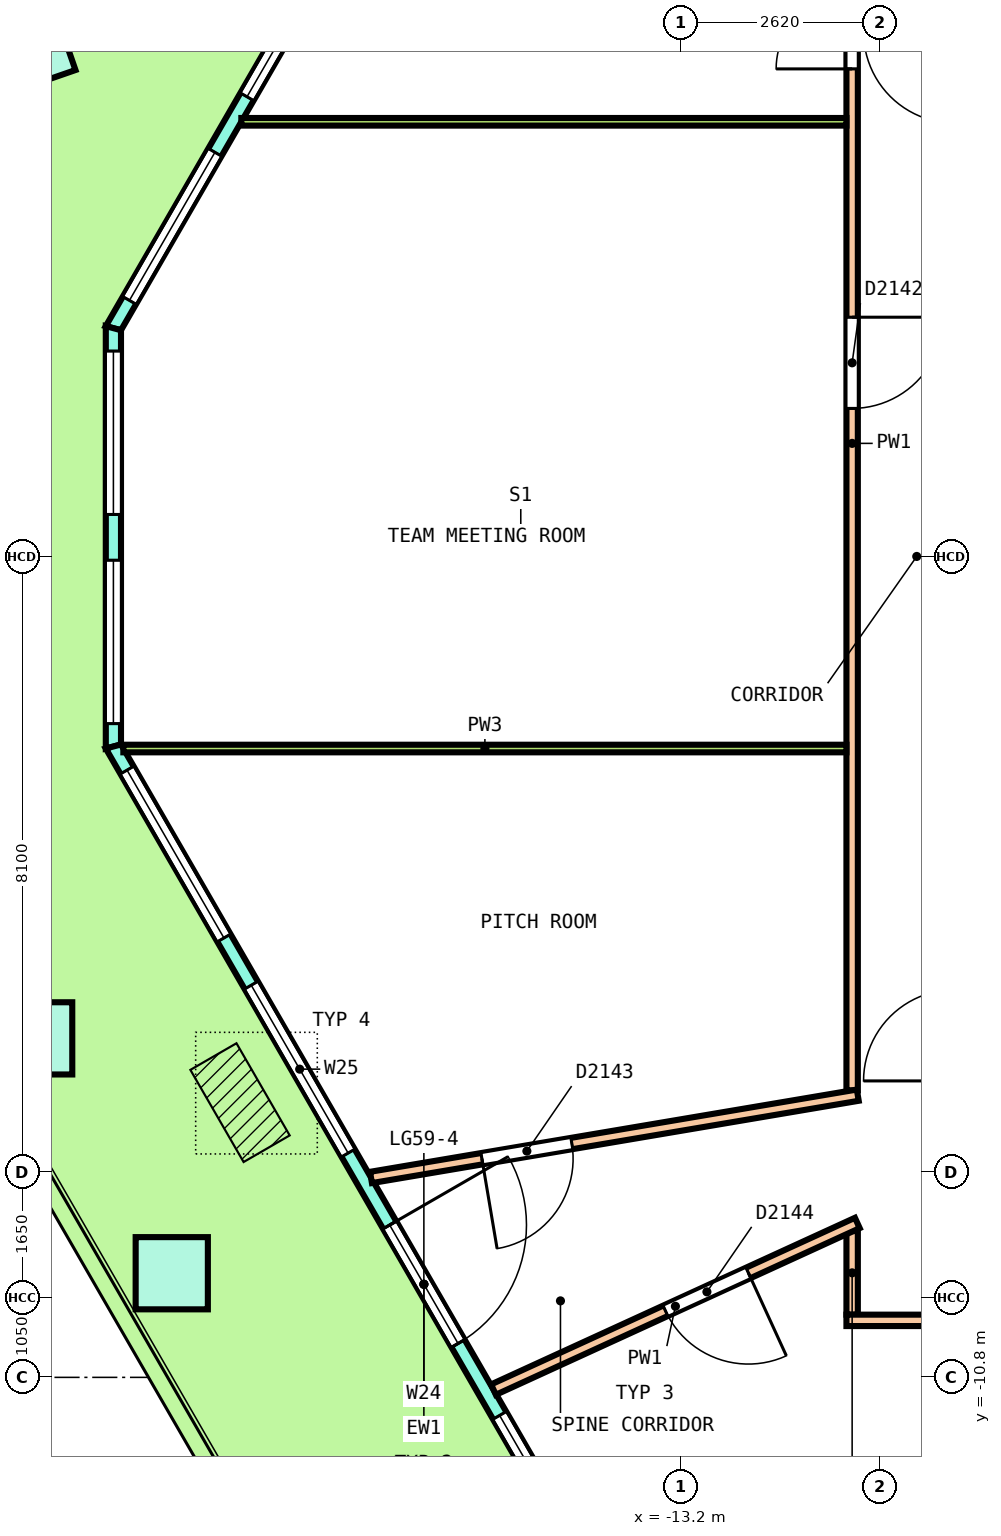
"""IFC4 building model, lengths in metres.
Left out: names, types, materials, properties, quantities, classifications, styles, units other than length and angle.
Written with IfcOpenShell. Run it as: python <this file> out.ifc"""

import sys

from ifc_helpers import new_model, si_unit, direction, frame, frame_2d, origin, origin_2d, place, context, subcontext, project, spatial, polyline, rectangle, outline, extrude, element, fill, save


model = new_model("IFC4")
c1 = context("Model", 3, precision=1e-05, world=origin(), true_north=direction((0.0, 1.0)))
c2 = subcontext(c1, "Body", "Model", "MODEL_VIEW")
j1 = project(units=[si_unit("LENGTHUNIT", "METRE"), si_unit("PLANEANGLEUNIT", "RADIAN")], contexts=[c1])
p1 = place(None, origin())
s1 = spatial("IfcSite", under=j1, at=p1, CompositionType="ELEMENT")
p2 = place(p1, origin())
s2 = spatial("IfcBuilding", under=s1, at=p2, CompositionType="ELEMENT")
p3 = place(p2, frame((0.0, 0.0, 271.0)))
s3 = spatial("IfcBuildingStorey", under=s2, at=p3, CompositionType="ELEMENT", Elevation=271.0)
p4 = place(p3, frame((-21.772, 6.692, 0.0), z_axis=(-0.021793949015, 0.025136579231, 0.999446434868), x_axis=(-0.499665408411, -0.866150057728, 0.010888394553)))
e1 = element("IfcColumn", 1, at=p4, inside=s3, PredefinedType="COLUMN", context=c2, shape_type="SweptSolid", body=[
    extrude(rectangle(XDim=0.95, YDim=0.95, at=origin_2d()), origin(), (0.0, 0.0, 1.0), 3.652),
])
p5 = place(p3, frame((-21.685, -6.34, 0.0), z_axis=(-0.010900423214, 0.018858400897, 0.999762742599), x_axis=(0.500590318805, -0.865410234662, 0.021782067434)))
e2 = element("IfcColumn", 2, at=p5, inside=s3, PredefinedType="COLUMN", context=c2, shape_type="SweptSolid", body=[
    extrude(rectangle(XDim=0.95, YDim=0.95, at=origin_2d()), origin(), (0.0, 0.0, 1.0), 3.651),
])
p6 = place(p3, frame((-19.901, -9.43, 0.0), z_axis=(-0.003611945175, 0.00628746012, 0.999973710503), x_axis=(0.497890394796, -0.867209649664, 0.007251089524)))
e3 = element("IfcColumn", 3, at=p6, inside=s3, PredefinedType="COLUMN", context=c2, shape_type="SweptSolid", body=[
    extrude(rectangle(XDim=0.95, YDim=0.95, at=origin_2d()), origin(), (0.0, 0.0, 1.0), 3.65),
])
p7 = place(p3, frame((-12.935, 16.398, 0.0), z_axis=(0.0, 0.0, 1.0), x_axis=(-0.500001185373, -0.866024719408, 0.0)))
e4 = element("IfcWall", 4, at=p7, inside=s3, PredefinedType="SOLIDWALL", context=c2, shape_type="SweptSolid", body=[
    extrude(outline(polyline([(-0.027, -0.1), (1.008, -0.1), (2.043, -0.1), (3.077, -0.1), (4.112, -0.1), (5.147, -0.1), (6.182, -0.1), (7.216, -0.1), (8.251, -0.1), (9.286, -0.1), (10.321, -0.1), (11.355, -0.1), (12.39, -0.1), (13.425, -0.1), (14.459, -0.1), (15.494, -0.1), (15.44, 0.1), (14.413, 0.1), (13.385, 0.1), (12.358, 0.1), (11.33, 0.1), (10.302, 0.1), (9.275, 0.1), (8.247, 0.1), (7.22, 0.1), (6.192, 0.1), (5.165, 0.1), (4.137, 0.1), (3.11, 0.1), (2.082, 0.1), (1.054, 0.1), (0.027, 0.1), (-0.027, -0.1)])), origin(), (0.0, 0.0, 1.0), 3.7),
])
p8 = place(p7, frame((0.422, 0.0, 0.1)))
e5 = element("IfcOpeningElement", 5, at=p8, cuts=e4, PredefinedType="OPENING", context=c2, shape_type="SweptSolid", body=[
    extrude(rectangle(XDim=2.25, YDim=2.75, at=frame_2d((1.125, 1.375))), frame((0.0, 0.11, 0.0), z_axis=(0.0, -1.0, 0.0), x_axis=(1.0, 0.0, 0.0)), (0.0, 0.0, 1.0), 0.22),
])
p9 = place(p7, frame((3.515, 0.0, 0.1)))
e6 = element("IfcOpeningElement", 6, at=p9, cuts=e4, PredefinedType="OPENING", context=c2, shape_type="SweptSolid", body=[
    extrude(rectangle(XDim=2.25, YDim=2.75, at=frame_2d((1.125, 1.375))), frame((0.0, 0.11, 0.0), z_axis=(0.0, -1.0, 0.0), x_axis=(1.0, 0.0, 0.0)), (0.0, 0.0, 1.0), 0.22),
])
p10 = place(p7, frame((6.834, 0.0, 0.0)))
e7 = element("IfcOpeningElement", 7, at=p10, cuts=e4, PredefinedType="OPENING", context=c2, shape_type="SweptSolid", body=[
    extrude(rectangle(XDim=1.8, YDim=2.4, at=frame_2d((0.9, 1.2))), frame((0.0, 0.11, 0.0), z_axis=(0.0, -1.0, 0.0), x_axis=(1.0, 0.0, 0.0)), (0.0, 0.0, 1.0), 0.22),
])
p11 = place(p7, frame((6.834, 0.0, 2.55)))
e8 = element("IfcOpeningElement", 8, at=p11, cuts=e4, PredefinedType="OPENING", context=c2, shape_type="SweptSolid", body=[
    extrude(rectangle(XDim=1.8, YDim=0.3, at=frame_2d((0.9, 0.15))), frame((0.0, 0.11, 0.0), z_axis=(0.0, -1.0, 0.0), x_axis=(1.0, 0.0, 0.0)), (0.0, 0.0, 1.0), 0.22),
])
p12 = place(p7, frame((9.702, 0.0, 0.1)))
e9 = element("IfcOpeningElement", 9, at=p12, cuts=e4, PredefinedType="OPENING", context=c2, shape_type="SweptSolid", body=[
    extrude(rectangle(XDim=2.25, YDim=2.75, at=frame_2d((1.125, 1.375))), frame((0.0, 0.11, 0.0), z_axis=(0.0, -1.0, 0.0), x_axis=(1.0, 0.0, 0.0)), (0.0, 0.0, 1.0), 0.22),
])
p13 = place(p7, frame((12.796, 0.0, 0.1)))
e10 = element("IfcOpeningElement", 10, at=p13, cuts=e4, PredefinedType="OPENING", context=c2, shape_type="SweptSolid", body=[
    extrude(rectangle(XDim=2.25, YDim=2.75, at=frame_2d((1.125, 1.375))), frame((0.0, 0.11, 0.0), z_axis=(0.0, -1.0, 0.0), x_axis=(1.0, 0.0, 0.0)), (0.0, 0.0, 1.0), 0.22),
])
p14 = place(p3, frame((-20.669, 3.003, 0.0), z_axis=(0.0, 0.0, 1.0), x_axis=(0.0, -1.0, 0.0)))
e11 = element("IfcWall", 11, at=p14, inside=s3, PredefinedType="SOLIDWALL", context=c2, shape_type="SweptSolid", body=[
    extrude(outline(polyline([(-0.027, -0.1), (1.084, -0.1), (2.196, -0.1), (3.307, -0.1), (4.419, -0.1), (5.53, -0.1), (5.477, 0.1), (4.387, 0.1), (3.297, 0.1), (2.207, 0.1), (1.117, 0.1), (0.027, 0.1), (-0.027, -0.1)])), origin(), (0.0, 0.0, 1.0), 3.7),
])
p15 = place(p14, frame((0.301, 0.0, 0.1)))
e12 = element("IfcOpeningElement", 12, at=p15, cuts=e11, PredefinedType="OPENING", context=c2, shape_type="SweptSolid", body=[
    extrude(rectangle(XDim=2.15, YDim=2.75, at=frame_2d((1.075, 1.375))), frame((0.0, 0.11, 0.0), z_axis=(0.0, -1.0, 0.0), x_axis=(1.0, 0.0, 0.0)), (0.0, 0.0, 1.0), 0.22),
])
p16 = place(p14, frame((3.052, 0.0, 0.1)))
e13 = element("IfcOpeningElement", 13, at=p16, cuts=e11, PredefinedType="OPENING", context=c2, shape_type="SweptSolid", body=[
    extrude(rectangle(XDim=2.15, YDim=2.75, at=frame_2d((1.075, 1.375))), frame((0.0, 0.11, 0.0), z_axis=(0.0, -1.0, 0.0), x_axis=(1.0, 0.0, 0.0)), (0.0, 0.0, 1.0), 0.22),
])
p17 = place(p3, frame((-20.669, -2.5, 0.0), z_axis=(0.0, 0.0, 1.0), x_axis=(0.50000098397, -0.866024835688, 0.0)))
e14 = element("IfcWall", 14, at=p17, inside=s3, PredefinedType="SOLIDWALL", context=c2, shape_type="SweptSolid", body=[
    extrude(outline(polyline([(-0.027, -0.1), (0.998, -0.1), (2.022, -0.1), (3.047, -0.1), (4.071, -0.1), (5.096, -0.1), (6.12, -0.1), (7.145, -0.1), (8.169, -0.1), (9.194, -0.1), (10.218, -0.1), (11.243, -0.1), (12.267, -0.1), (13.292, -0.1), (14.316, -0.1), (15.341, -0.1), (16.365, -0.1), (16.312, 0.1), (15.294, 0.1), (14.276, 0.1), (13.258, 0.1), (12.24, 0.1), (11.223, 0.1), (10.205, 0.1), (9.187, 0.1), (8.169, 0.1), (7.151, 0.1), (6.134, 0.1), (5.116, 0.1), (4.098, 0.1), (3.08, 0.1), (2.062, 0.1), (1.045, 0.1), (0.027, 0.1), (-0.027, -0.1)])), origin(), (0.0, 0.0, 1.0), 3.7),
])
p18 = place(p17, frame((0.359, 0.0, 0.1)))
e15 = element("IfcOpeningElement", 15, at=p18, cuts=e14, PredefinedType="OPENING", context=c2, shape_type="SweptSolid", body=[
    extrude(rectangle(XDim=2.55, YDim=2.75, at=frame_2d((1.275, 1.375))), frame((0.0, 0.11, 0.0), z_axis=(0.0, -1.0, 0.0), x_axis=(1.0, 0.0, 0.0)), (0.0, 0.0, 1.0), 0.22),
])
p19 = place(p17, frame((3.626, 0.0, 0.1)))
e16 = element("IfcOpeningElement", 16, at=p19, cuts=e14, PredefinedType="OPENING", context=c2, shape_type="SweptSolid", body=[
    extrude(rectangle(XDim=2.55, YDim=2.75, at=frame_2d((1.275, 1.375))), frame((0.0, 0.11, 0.0), z_axis=(0.0, -1.0, 0.0), x_axis=(1.0, 0.0, 0.0)), (0.0, 0.0, 1.0), 0.22),
])
p20 = place(p17, frame((7.269, 0.0, 0.0)))
e17 = element("IfcOpeningElement", 17, at=p20, cuts=e14, PredefinedType="OPENING", context=c2, shape_type="SweptSolid", body=[
    extrude(rectangle(XDim=1.8, YDim=2.4, at=frame_2d((0.9, 1.2))), frame((0.0, 0.11, 0.0), z_axis=(0.0, -1.0, 0.0), x_axis=(1.0, 0.0, 0.0)), (0.0, 0.0, 1.0), 0.22),
])
p21 = place(p17, frame((7.269, 0.0, 2.55)))
e18 = element("IfcOpeningElement", 18, at=p21, cuts=e14, PredefinedType="OPENING", context=c2, shape_type="SweptSolid", body=[
    extrude(rectangle(XDim=1.8, YDim=0.3, at=frame_2d((0.9, 0.15))), frame((0.0, 0.11, 0.0), z_axis=(0.0, -1.0, 0.0), x_axis=(1.0, 0.0, 0.0)), (0.0, 0.0, 1.0), 0.22),
])
p22 = place(p17, frame((10.162, 0.0, 0.1)))
e19 = element("IfcOpeningElement", 19, at=p22, cuts=e14, PredefinedType="OPENING", context=c2, shape_type="SweptSolid", body=[
    extrude(rectangle(XDim=2.55, YDim=2.75, at=frame_2d((1.275, 1.375))), frame((0.0, 0.11, 0.0), z_axis=(0.0, -1.0, 0.0), x_axis=(1.0, 0.0, 0.0)), (0.0, 0.0, 1.0), 0.22),
])
p23 = place(p17, frame((13.429, 0.0, 0.1)))
e20 = element("IfcOpeningElement", 20, at=p23, cuts=e14, PredefinedType="OPENING", context=c2, shape_type="SweptSolid", body=[
    extrude(rectangle(XDim=2.55, YDim=2.75, at=frame_2d((1.275, 1.375))), frame((0.0, 0.11, 0.0), z_axis=(0.0, -1.0, 0.0), x_axis=(1.0, 0.0, 0.0)), (0.0, 0.0, 1.0), 0.22),
])
p24 = place(p3, frame((-10.95, -9.975, 0.0), z_axis=(0.0, 0.0, 1.0), x_axis=(0.0, 1.0, 0.0)))
e21 = element("IfcWall", 21, at=p24, inside=s3, PredefinedType="PARTITIONING", context=c2, shape_type="SweptSolid", body=[
    extrude(rectangle(XDim=1.1, YDim=0.15, at=frame_2d((0.55, 0.0))), origin(), (0.0, 0.0, 1.0), 3.7),
])
p25 = place(p3, frame((-10.95, -7.025, 0.0), z_axis=(0.0, 0.0, 1.0), x_axis=(0.0, 1.0, 0.0)))
e22 = element("IfcWall", 22, at=p25, inside=s3, PredefinedType="PARTITIONING", context=c2, shape_type="SweptSolid", body=[
    extrude(rectangle(XDim=17.025, YDim=0.15, at=frame_2d((8.512, 0.0))), origin(), (0.0, 0.0, 1.0), 2.9),
])
p26 = place(p25, frame((13.439, 0.0, 0.0)))
e23 = element("IfcOpeningElement", 23, at=p26, cuts=e22, PredefinedType="OPENING", context=c2, shape_type="SweptSolid", body=[
    extrude(rectangle(XDim=1.0, YDim=2.1, at=frame_2d((0.5, 1.05))), frame((0.0, 0.085, 0.0), z_axis=(0.0, -1.0, 0.0), x_axis=(1.0, 0.0, 0.0)), (0.0, 0.0, 1.0), 0.17),
])
p27 = place(p25, frame((8.972, 0.0, 0.0)))
e24 = element("IfcOpeningElement", 24, at=p27, cuts=e22, PredefinedType="OPENING", context=c2, shape_type="SweptSolid", body=[
    extrude(rectangle(XDim=1.2, YDim=2.1, at=frame_2d((0.6, 1.05))), frame((0.0, 0.085, 0.0), z_axis=(0.0, -1.0, 0.0), x_axis=(1.0, 0.0, 0.0)), (0.0, 0.0, 1.0), 0.17),
])
p28 = place(p3, frame((-11.025, -10.05, 0.0), z_axis=(0.0, 0.0, 1.0), x_axis=(1.0, 0.0, 0.0)))
e25 = element("IfcWall", 25, at=p28, inside=s3, PredefinedType="PARTITIONING", context=c2, shape_type="SweptSolid", body=[
    extrude(rectangle(XDim=21.925, YDim=0.15, at=frame_2d((10.962, 0.0))), origin(), (0.0, 0.0, 1.0), 2.9),
])
p29 = place(p28, frame((6.209, 0.0, 0.0)))
e26 = element("IfcOpeningElement", 26, at=p29, cuts=e25, PredefinedType="OPENING", context=c2, shape_type="SweptSolid", body=[
    extrude(rectangle(XDim=1.2, YDim=2.1, at=frame_2d((0.6, 1.05))), frame((0.0, 0.085, 0.0), z_axis=(0.0, -1.0, 0.0), x_axis=(1.0, 0.0, 0.0)), (0.0, 0.0, 1.0), 0.17),
])
p30 = place(p28, frame((14.606, 0.0, 0.0)))
e27 = element("IfcOpeningElement", 27, at=p30, cuts=e25, PredefinedType="OPENING", context=c2, shape_type="SweptSolid", body=[
    extrude(rectangle(XDim=1.2, YDim=2.1, at=frame_2d((0.6, 1.05))), frame((0.0, 0.085, 0.0), z_axis=(0.0, -1.0, 0.0), x_axis=(1.0, 0.0, 0.0)), (0.0, 0.0, 1.0), 0.17),
])
p31 = place(p3, frame((-17.28, -8.17, 0.0), z_axis=(0.0, 0.0, 1.0), x_axis=(0.986013403935, 0.166666035112, 0.0)))
e28 = element("IfcWall", 28, at=p31, inside=s3, PredefinedType="PARTITIONING", context=c2, shape_type="SweptSolid", body=[
    extrude(rectangle(XDim=6.495, YDim=0.15, at=frame_2d((3.248, 0.0))), origin(), (0.0, 0.0, 1.0), 2.9),
])
p32 = place(p31, frame((1.48, 0.0, 0.0)))
e29 = element("IfcOpeningElement", 29, at=p32, cuts=e28, PredefinedType="OPENING", context=c2, shape_type="SweptSolid", body=[
    extrude(rectangle(XDim=1.2, YDim=2.1, at=frame_2d((0.6, 1.05))), frame((0.0, 0.085, 0.0), z_axis=(0.0, -1.0, 0.0), x_axis=(1.0, 0.0, 0.0)), (0.0, 0.0, 1.0), 0.17),
])
p33 = place(p3, frame((-15.669, -10.961, 0.0), z_axis=(0.0, 0.0, 1.0), x_axis=(0.909197237165, 0.416365685342, 0.0)))
e30 = element("IfcWall", 30, at=p33, inside=s3, PredefinedType="PARTITIONING", context=c2, shape_type="SweptSolid", body=[
    extrude(rectangle(XDim=5.265, YDim=0.15, at=frame_2d((2.632, 0.0))), origin(), (0.0, 0.0, 1.0), 2.9),
])
p34 = place(p33, frame((2.489, 0.0, 0.0)))
e31 = element("IfcOpeningElement", 31, at=p34, cuts=e30, PredefinedType="OPENING", context=c2, shape_type="SweptSolid", body=[
    extrude(rectangle(XDim=1.2, YDim=2.1, at=frame_2d((0.6, 1.05))), frame((0.0, 0.085, 0.0), z_axis=(0.0, -1.0, 0.0), x_axis=(1.0, 0.0, 0.0)), (0.0, 0.0, 1.0), 0.17),
])
p35 = place(p3, frame((-18.986, 5.718, 0.0), z_axis=(0.0, 0.0, 1.0), x_axis=(1.0, 0.0, 0.0)))
e32 = element("IfcWall", 32, at=p35, inside=s3, PredefinedType="PARTITIONING", context=c2, shape_type="SweptSolid", body=[
    extrude(rectangle(XDim=7.961, YDim=0.1, at=frame_2d((3.98, 0.0))), origin(), (0.0, 0.0, 1.0), 2.9),
])
p36 = place(p3, frame((-20.538, -2.527, 0.0), z_axis=(0.0, 0.0, 1.0), x_axis=(1.0, 0.0, 0.0)))
e33 = element("IfcWall", 33, at=p36, inside=s3, PredefinedType="PARTITIONING", context=c2, shape_type="SweptSolid", body=[
    extrude(rectangle(XDim=9.513, YDim=0.1, at=frame_2d((4.757, 0.0))), origin(), (0.0, 0.0, 1.0), 2.9),
])
p37 = place(p12, origin())
e34 = element("IfcWindow", 34, at=p37, inside=s3, PartitioningType="SINGLE_PANEL", PredefinedType="WINDOW", context=c2, shape_type="SweptSolid", body=[
    extrude(rectangle(XDim=2.25, YDim=2.75, at=frame_2d((1.125, 1.375))), frame((0.0, 0.03, 0.0), z_axis=(0.0, -1.0, 0.0), x_axis=(1.0, 0.0, 0.0)), (0.0, 0.0, 1.0), 0.06),
])
fill(e9, e34)
p38 = place(p13, origin())
e35 = element("IfcWindow", 35, at=p38, inside=s3, PartitioningType="SINGLE_PANEL", PredefinedType="WINDOW", context=c2, shape_type="SweptSolid", body=[
    extrude(rectangle(XDim=2.25, YDim=2.75, at=frame_2d((1.125, 1.375))), frame((0.0, 0.03, 0.0), z_axis=(0.0, -1.0, 0.0), x_axis=(1.0, 0.0, 0.0)), (0.0, 0.0, 1.0), 0.06),
])
fill(e10, e35)
p39 = place(p15, origin())
e36 = element("IfcWindow", 36, at=p39, inside=s3, PartitioningType="SINGLE_PANEL", PredefinedType="WINDOW", context=c2, shape_type="SweptSolid", body=[
    extrude(rectangle(XDim=2.15, YDim=2.75, at=frame_2d((1.075, 1.375))), frame((0.0, 0.03, 0.0), z_axis=(0.0, -1.0, 0.0), x_axis=(1.0, 0.0, 0.0)), (0.0, 0.0, 1.0), 0.06),
])
fill(e12, e36)
p40 = place(p16, origin())
e37 = element("IfcWindow", 37, at=p40, inside=s3, PartitioningType="SINGLE_PANEL", PredefinedType="WINDOW", context=c2, shape_type="SweptSolid", body=[
    extrude(rectangle(XDim=2.15, YDim=2.75, at=frame_2d((1.075, 1.375))), frame((0.0, 0.03, 0.0), z_axis=(0.0, -1.0, 0.0), x_axis=(1.0, 0.0, 0.0)), (0.0, 0.0, 1.0), 0.06),
])
fill(e13, e37)
p41 = place(p18, origin())
e38 = element("IfcWindow", 38, at=p41, inside=s3, PartitioningType="SINGLE_PANEL", PredefinedType="WINDOW", context=c2, shape_type="SweptSolid", body=[
    extrude(rectangle(XDim=2.55, YDim=2.75, at=frame_2d((1.275, 1.375))), frame((0.0, 0.03, 0.0), z_axis=(0.0, -1.0, 0.0), x_axis=(1.0, 0.0, 0.0)), (0.0, 0.0, 1.0), 0.06),
])
fill(e15, e38)
p42 = place(p19, origin())
e39 = element("IfcWindow", 39, at=p42, inside=s3, PartitioningType="SINGLE_PANEL", PredefinedType="WINDOW", context=c2, shape_type="SweptSolid", body=[
    extrude(rectangle(XDim=2.55, YDim=2.75, at=frame_2d((1.275, 1.375))), frame((0.0, 0.03, 0.0), z_axis=(0.0, -1.0, 0.0), x_axis=(1.0, 0.0, 0.0)), (0.0, 0.0, 1.0), 0.06),
])
fill(e16, e39)
p43 = place(p20, origin())
e40 = element("IfcDoor", 40, at=p43, inside=s3, OperationType="DOUBLE_DOOR_SINGLE_SWING", PredefinedType="DOOR", context=c2, shape_type="SweptSolid", body=[
    extrude(rectangle(XDim=1.8, YDim=2.4, at=frame_2d((0.9, 1.2))), frame((0.0, 0.025, 0.0), z_axis=(0.0, -1.0, 0.0), x_axis=(1.0, 0.0, 0.0)), (0.0, 0.0, 1.0), 0.05),
])
fill(e17, e40)
p44 = place(p21, origin())
e41 = element("IfcWindow", 41, at=p44, inside=s3, PartitioningType="SINGLE_PANEL", PredefinedType="WINDOW", context=c2, shape_type="SweptSolid", body=[
    extrude(rectangle(XDim=1.8, YDim=0.3, at=frame_2d((0.9, 0.15))), frame((0.0, 0.03, 0.0), z_axis=(0.0, -1.0, 0.0), x_axis=(1.0, 0.0, 0.0)), (0.0, 0.0, 1.0), 0.06),
])
fill(e18, e41)
p45 = place(p22, origin())
e42 = element("IfcWindow", 42, at=p45, inside=s3, PartitioningType="SINGLE_PANEL", PredefinedType="WINDOW", context=c2, shape_type="SweptSolid", body=[
    extrude(rectangle(XDim=2.55, YDim=2.75, at=frame_2d((1.275, 1.375))), frame((0.0, 0.03, 0.0), z_axis=(0.0, -1.0, 0.0), x_axis=(1.0, 0.0, 0.0)), (0.0, 0.0, 1.0), 0.06),
])
fill(e19, e42)
p46 = place(p26, origin())
e43 = element("IfcDoor", 43, at=p46, inside=s3, OperationType="SINGLE_SWING_LEFT", PredefinedType="DOOR", context=c2, shape_type="SweptSolid", body=[
    extrude(rectangle(XDim=1.0, YDim=2.1, at=frame_2d((0.5, 1.05))), frame((0.0, 0.025, 0.0), z_axis=(0.0, -1.0, 0.0), x_axis=(1.0, 0.0, 0.0)), (0.0, 0.0, 1.0), 0.05),
])
fill(e23, e43)
p47 = place(p27, origin())
e44 = element("IfcDoor", 44, at=p47, inside=s3, OperationType="DOUBLE_DOOR_SINGLE_SWING", PredefinedType="DOOR", context=c2, shape_type="SweptSolid", body=[
    extrude(rectangle(XDim=1.2, YDim=2.1, at=frame_2d((0.6, 1.05))), frame((0.0, 0.025, 0.0), z_axis=(0.0, -1.0, 0.0), x_axis=(1.0, 0.0, 0.0)), (0.0, 0.0, 1.0), 0.05),
])
fill(e24, e44)
p48 = place(p32, origin())
e45 = element("IfcDoor", 45, at=p48, inside=s3, OperationType="DOUBLE_DOOR_SINGLE_SWING", PredefinedType="DOOR", context=c2, shape_type="SweptSolid", body=[
    extrude(rectangle(XDim=1.2, YDim=2.1, at=frame_2d((0.6, 1.05))), frame((0.0, 0.025, 0.0), z_axis=(0.0, -1.0, 0.0), x_axis=(1.0, 0.0, 0.0)), (0.0, 0.0, 1.0), 0.05),
])
fill(e29, e45)
p49 = place(p34, origin())
e46 = element("IfcDoor", 46, at=p49, inside=s3, OperationType="DOUBLE_DOOR_SINGLE_SWING", PredefinedType="DOOR", context=c2, shape_type="SweptSolid", body=[
    extrude(rectangle(XDim=1.2, YDim=2.1, at=frame_2d((0.6, 1.05))), frame((0.0, 0.025, 0.0), z_axis=(0.0, -1.0, 0.0), x_axis=(1.0, 0.0, 0.0)), (0.0, 0.0, 1.0), 0.05),
])
fill(e31, e46)
save(model, sys.argv[1])
